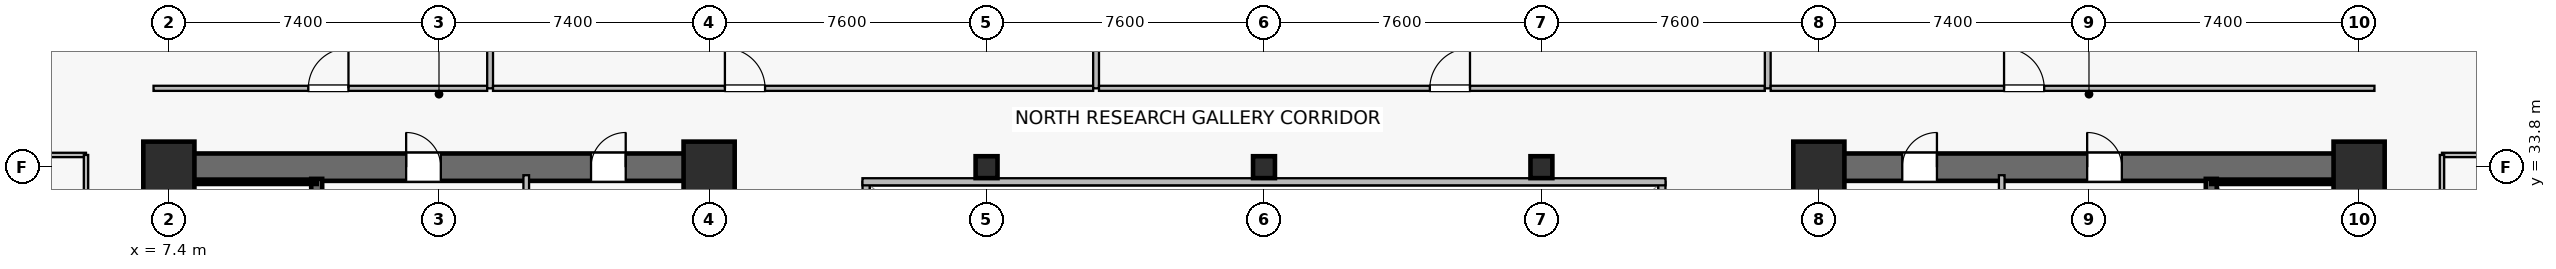
"""IFC4 building model, lengths in metres.
Left out: names, types, materials, properties, quantities, classifications, styles, units other than length and angle.
Written with IfcOpenShell. Run it as: python <this file> out.ifc"""

import sys

from ifc_helpers import new_model, si_unit, direction, frame, frame_2d, origin, origin_2d, place, context, subcontext, project, spatial, rectangle, hollow_rectangle, extrude, source, transform, mapped, element, fill, save


model = new_model("IFC4")
c1 = context("Model", 3, precision=1e-05, world=origin(), true_north=direction((0.0, 1.0)))
c2 = subcontext(c1, "Body", "Model", "MODEL_VIEW")
j1 = project(units=[si_unit("LENGTHUNIT", "METRE"), si_unit("PLANEANGLEUNIT", "RADIAN")], contexts=[c1])
p1 = place(None, origin())
s1 = spatial("IfcSite", under=j1, at=p1, CompositionType="ELEMENT")
p2 = place(p1, origin())
s2 = spatial("IfcBuilding", under=s1, at=p2, CompositionType="ELEMENT")
p3 = place(p2, frame((0.0, 0.0, 90.8)))
s3 = spatial("IfcBuildingStorey", under=s2, at=p3, CompositionType="ELEMENT", Elevation=90.8)
p4 = place(p3, frame((7.025, 33.8, 0.0), z_axis=(0.0, 0.0, 1.0), x_axis=(1.0, 0.0, 0.0)))
e1 = element("IfcWall", 1, at=p4, inside=s3, PredefinedType="SHEAR", context=c2, shape_type="SweptSolid", body=[
    extrude(rectangle(XDim=15.55, YDim=0.75, at=frame_2d((7.775, 0.0))), origin(), (0.0, 0.0, 1.0), 3.78),
])
p5 = place(p4, frame((6.875, 0.0, 0.0)))
e2 = element("IfcOpeningElement", 2, at=p5, cuts=e1, PredefinedType="OPENING", context=c2, shape_type="SweptSolid", body=[
    extrude(rectangle(XDim=0.95, YDim=2.15, at=frame_2d((0.475, 1.075))), frame((0.0, 0.385, 0.0), z_axis=(0.0, -1.0, 0.0), x_axis=(1.0, 0.0, 0.0)), (0.0, 0.0, 1.0), 0.77),
])
p6 = place(p4, frame((11.94, 0.0, 0.0)))
e3 = element("IfcOpeningElement", 3, at=p6, cuts=e1, PredefinedType="OPENING", context=c2, shape_type="SweptSolid", body=[
    extrude(rectangle(XDim=0.95, YDim=2.15, at=frame_2d((0.475, 1.075))), frame((0.0, 0.385, 0.0), z_axis=(0.0, -1.0, 0.0), x_axis=(1.0, 0.0, 0.0)), (0.0, 0.0, 1.0), 0.77),
])
p7 = place(p3, frame((7.4, 15.175, 0.0), z_axis=(0.0, 0.0, 1.0), x_axis=(0.0, 1.0, 0.0)))
e4 = element("IfcWall", 4, at=p7, inside=s3, PredefinedType="SHEAR", context=c2, shape_type="SweptSolid", body=[
    extrude(rectangle(XDim=18.25, YDim=0.75, at=frame_2d((9.125, 0.0))), origin(), (0.0, 0.0, 1.0), 3.78),
])
p8 = place(p3, frame((22.2, 15.175, 0.0), z_axis=(0.0, 0.0, 1.0), x_axis=(0.0, 1.0, 0.0)))
e5 = element("IfcWall", 5, at=p8, inside=s3, PredefinedType="SHEAR", context=c2, shape_type="SweptSolid", body=[
    extrude(rectangle(XDim=18.25, YDim=0.75, at=frame_2d((9.125, 0.0))), origin(), (0.0, 0.0, 1.0), 3.78),
])
p9 = place(p8, frame((3.375, 0.0, 0.0)))
e6 = element("IfcOpeningElement", 6, at=p9, cuts=e5, PredefinedType="OPENING", context=c2, shape_type="SweptSolid", body=[
    extrude(rectangle(XDim=1.42, YDim=2.2, at=frame_2d((0.71, 1.1))), frame((0.0, 0.385, 0.0), z_axis=(0.0, -1.0, 0.0), x_axis=(1.0, 0.0, 0.0)), (0.0, 0.0, 1.0), 0.77),
])
p10 = place(p3, frame((11.45, 24.85, 0.0), z_axis=(0.0, 0.0, 1.0), x_axis=(0.0, 1.0, 0.0)))
e7 = element("IfcWall", 7, at=p10, inside=s3, PredefinedType="SHEAR", context=c2, shape_type="SweptSolid", body=[
    extrude(rectangle(XDim=8.63, YDim=0.3, at=frame_2d((4.315, 0.0))), origin(), (0.0, 0.0, 1.0), 3.78),
])
p11 = place(p10, frame((0.42, 0.0, 0.0)))
e8 = element("IfcOpeningElement", 8, at=p11, cuts=e7, PredefinedType="OPENING", context=c2, shape_type="SweptSolid", body=[
    extrude(rectangle(XDim=1.1, YDim=2.15, at=frame_2d((0.55, 1.075))), frame((0.0, 0.16, 0.0), z_axis=(0.0, -1.0, 0.0), x_axis=(1.0, 0.0, 0.0)), (0.0, 0.0, 1.0), 0.32),
])
p12 = place(p3, frame((7.73, 33.4, 0.0), z_axis=(0.0, 0.0, 1.0), x_axis=(1.0, 0.0, 0.0)))
e9 = element("IfcWall", 9, at=p12, inside=s3, PredefinedType="SOLIDWALL", context=c2, shape_type="SweptSolid", body=[
    extrude(rectangle(XDim=3.72, YDim=0.12, at=frame_2d((1.86, 0.0))), origin(), (0.0, 0.0, 1.0), 3.78),
])
p13 = place(p3, frame((52.225, 33.8, 0.0), z_axis=(0.0, 0.0, 1.0), x_axis=(1.0, 0.0, 0.0)))
e10 = element("IfcWall", 10, at=p13, inside=s3, PredefinedType="SHEAR", context=c2, shape_type="SweptSolid", body=[
    extrude(rectangle(XDim=15.55, YDim=0.75, at=frame_2d((7.775, 0.0))), origin(), (0.0, 0.0, 1.0), 3.78),
])
p14 = place(p13, frame((7.725, 0.0, 0.0)))
e11 = element("IfcOpeningElement", 11, at=p14, cuts=e10, PredefinedType="OPENING", context=c2, shape_type="SweptSolid", body=[
    extrude(rectangle(XDim=0.95, YDim=2.15, at=frame_2d((0.475, 1.075))), frame((0.0, 0.385, 0.0), z_axis=(0.0, -1.0, 0.0), x_axis=(1.0, 0.0, 0.0)), (0.0, 0.0, 1.0), 0.77),
])
p15 = place(p13, frame((2.66, 0.0, 0.0)))
e12 = element("IfcOpeningElement", 12, at=p15, cuts=e10, PredefinedType="OPENING", context=c2, shape_type="SweptSolid", body=[
    extrude(rectangle(XDim=0.95, YDim=2.15, at=frame_2d((0.475, 1.075))), frame((0.0, 0.385, 0.0), z_axis=(0.0, -1.0, 0.0), x_axis=(1.0, 0.0, 0.0)), (0.0, 0.0, 1.0), 0.77),
])
p16 = place(p3, frame((52.6, 15.175, 0.0), z_axis=(0.0, 0.0, 1.0), x_axis=(0.0, 1.0, 0.0)))
e13 = element("IfcWall", 13, at=p16, inside=s3, PredefinedType="SHEAR", context=c2, shape_type="SweptSolid", body=[
    extrude(rectangle(XDim=18.25, YDim=0.75, at=frame_2d((9.125, 0.0))), origin(), (0.0, 0.0, 1.0), 3.78),
])
p17 = place(p16, frame((3.375, 0.0, 0.0)))
e14 = element("IfcOpeningElement", 14, at=p17, cuts=e13, PredefinedType="OPENING", context=c2, shape_type="SweptSolid", body=[
    extrude(rectangle(XDim=1.42, YDim=2.2, at=frame_2d((0.71, 1.1))), frame((0.0, 0.385, 0.0), z_axis=(0.0, -1.0, 0.0), x_axis=(1.0, 0.0, 0.0)), (0.0, 0.0, 1.0), 0.77),
])
p18 = place(p3, frame((67.4, 15.175, 0.0), z_axis=(0.0, 0.0, 1.0), x_axis=(0.0, 1.0, 0.0)))
e15 = element("IfcWall", 15, at=p18, inside=s3, PredefinedType="SHEAR", context=c2, shape_type="SweptSolid", body=[
    extrude(rectangle(XDim=18.25, YDim=0.75, at=frame_2d((9.125, 0.0))), origin(), (0.0, 0.0, 1.0), 3.78),
])
p19 = place(p3, frame((63.35, 24.85, 0.0), z_axis=(0.0, 0.0, 1.0), x_axis=(0.0, 1.0, 0.0)))
e16 = element("IfcWall", 16, at=p19, inside=s3, PredefinedType="SHEAR", context=c2, shape_type="SweptSolid", body=[
    extrude(rectangle(XDim=8.63, YDim=0.3, at=frame_2d((4.315, 0.0))), origin(), (0.0, 0.0, 1.0), 3.78),
])
p20 = place(p19, frame((0.42, 0.0, 0.0)))
e17 = element("IfcOpeningElement", 17, at=p20, cuts=e16, PredefinedType="OPENING", context=c2, shape_type="SweptSolid", body=[
    extrude(rectangle(XDim=1.1, YDim=2.15, at=frame_2d((0.55, 1.075))), frame((0.0, 0.16, 0.0), z_axis=(0.0, -1.0, 0.0), x_axis=(1.0, 0.0, 0.0)), (0.0, 0.0, 1.0), 0.32),
])
p21 = place(p3, frame((63.35, 33.4, 0.0), z_axis=(0.0, 0.0, 1.0), x_axis=(1.0, 0.0, 0.0)))
e18 = element("IfcWall", 18, at=p21, inside=s3, PredefinedType="SOLIDWALL", context=c2, shape_type="SweptSolid", body=[
    extrude(rectangle(XDim=3.72, YDim=0.12, at=frame_2d((1.86, 0.0))), origin(), (0.0, 0.0, 1.0), 3.78),
])
m1 = source(origin(), c2, "Body", "SweptSolid", [
    extrude(rectangle(XDim=1.4, YDim=1.4, at=origin_2d()), origin(), (0.0, 0.0, 1.0), 4.1),
])
for number, where, z_axis, x_axis in (
    (19, (7.4, 33.8, 0.0), (0.0, 0.0, 1.0), (1.0, 0.0, 0.0)),
    (20, (22.2, 33.8, 0.0), (0.0, 0.0, 1.0), (1.0, 0.0, 0.0)),
    (21, (52.6, 33.8, 0.0), (0.0, 0.0, 1.0), (1.0, 0.0, 0.0)),
    (22, (67.4, 33.8, 0.0), (0.0, 0.0, 1.0), (1.0, 0.0, 0.0)),
):
    element("IfcColumn", number, at=place(p3, frame(where, z_axis=z_axis, x_axis=x_axis)), inside=s3, PredefinedType="COLUMN", context=c2, shape_type="MappedRepresentation", body=[
        mapped(m1, transform((0.0, 0.0, 0.0), scale=1.0)),
    ])
m2 = source(origin(), c2, "Body", "SweptSolid", [
    extrude(hollow_rectangle(XDim=0.6, YDim=0.6, WallThickness=0.028, at=origin_2d()), origin(), (0.0, 0.0, 1.0), 4.1),
])
for number, where, z_axis, x_axis in (
    (23, (29.8, 33.8, 0.0), (0.0, 0.0, 1.0), (1.0, 0.0, 0.0)),
    (24, (37.4, 33.8, 0.0), (0.0, 0.0, 1.0), (1.0, 0.0, 0.0)),
    (25, (45.0, 33.8, 0.0), (0.0, 0.0, 1.0), (1.0, 0.0, 0.0)),
):
    element("IfcColumn", number, at=place(p3, frame(where, z_axis=z_axis, x_axis=x_axis)), inside=s3, PredefinedType="COLUMN", context=c2, shape_type="MappedRepresentation", body=[
        mapped(m2, transform((0.0, 0.0, 0.0), scale=1.0)),
    ])
for number, where, z_axis, x_axis in (
    (26, (17.19, 29.65, 0.0), (0.0, 0.0, 1.0), (0.0, 1.0, 0.0)),
    (27, (57.61, 29.65, 0.0), (0.0, 0.0, 1.0), (0.0, 1.0, 0.0)),
):
    element("IfcWall", number, at=place(p3, frame(where, z_axis=z_axis, x_axis=x_axis)), inside=s3, PredefinedType="PLUMBINGWALL", context=c2, shape_type="SweptSolid", body=[
        extrude(rectangle(XDim=3.93, YDim=0.155, at=frame_2d((1.965, 0.0))), origin(), (0.0, 0.0, 1.0), 3.78),
    ])
p22 = place(p3, frame((26.5, 15.2, 0.0), z_axis=(0.0, 0.0, 1.0), x_axis=(0.0, 1.0, 0.0)))
e28 = element("IfcWall", 28, at=p22, inside=s3, PredefinedType="SOLIDWALL", context=c2, shape_type="SweptSolid", body=[
    extrude(rectangle(XDim=18.2, YDim=0.195, at=frame_2d((9.1, 0.0))), origin(), (0.0, 0.0, 1.0), 3.78),
])
p23 = place(p22, frame((1.8, 0.0, 0.9)))
e29 = element("IfcOpeningElement", 29, at=p23, cuts=e28, PredefinedType="OPENING", context=c2, shape_type="SweptSolid", body=[
    extrude(rectangle(XDim=1.5, YDim=1.4, at=frame_2d((0.75, 0.7))), frame((0.0, 0.107, 0.0), z_axis=(0.0, -1.0, 0.0), x_axis=(1.0, 0.0, 0.0)), (0.0, 0.0, 1.0), 0.215),
])
p24 = place(p22, frame((13.2, 0.0, 0.9)))
e30 = element("IfcOpeningElement", 30, at=p24, cuts=e28, PredefinedType="OPENING", context=c2, shape_type="SweptSolid", body=[
    extrude(rectangle(XDim=1.5, YDim=1.4, at=frame_2d((0.75, 0.7))), frame((0.0, 0.107, 0.0), z_axis=(0.0, -1.0, 0.0), x_axis=(1.0, 0.0, 0.0)), (0.0, 0.0, 1.0), 0.215),
])
p25 = place(p3, frame((48.3, 15.2, 0.0), z_axis=(0.0, 0.0, 1.0), x_axis=(0.0, 1.0, 0.0)))
e31 = element("IfcWall", 31, at=p25, inside=s3, PredefinedType="SOLIDWALL", context=c2, shape_type="SweptSolid", body=[
    extrude(rectangle(XDim=18.2, YDim=0.195, at=frame_2d((9.1, 0.0))), origin(), (0.0, 0.0, 1.0), 3.78),
])
p26 = place(p25, frame((1.8, 0.0, 0.9)))
e32 = element("IfcOpeningElement", 32, at=p26, cuts=e31, PredefinedType="OPENING", context=c2, shape_type="SweptSolid", body=[
    extrude(rectangle(XDim=1.5, YDim=1.4, at=frame_2d((0.75, 0.7))), frame((0.0, 0.107, 0.0), z_axis=(0.0, -1.0, 0.0), x_axis=(1.0, 0.0, 0.0)), (0.0, 0.0, 1.0), 0.215),
])
p27 = place(p25, frame((13.2, 0.0, 0.9)))
e33 = element("IfcOpeningElement", 33, at=p27, cuts=e31, PredefinedType="OPENING", context=c2, shape_type="SweptSolid", body=[
    extrude(rectangle(XDim=1.5, YDim=1.4, at=frame_2d((0.75, 0.7))), frame((0.0, 0.107, 0.0), z_axis=(0.0, -1.0, 0.0), x_axis=(1.0, 0.0, 0.0)), (0.0, 0.0, 1.0), 0.215),
])
p28 = place(p3, frame((26.4, 33.4, 0.0), z_axis=(0.0, 0.0, 1.0), x_axis=(1.0, 0.0, 0.0)))
e34 = element("IfcWall", 34, at=p28, inside=s3, PredefinedType="SOLIDWALL", context=c2, shape_type="SweptSolid", body=[
    extrude(rectangle(XDim=22.0, YDim=0.195, at=frame_2d((11.0, 0.0))), origin(), (0.0, 0.0, 1.0), 3.78),
])
p29 = place(p3, frame((6.98, 35.96, 0.0), z_axis=(0.0, 0.0, 1.0), x_axis=(1.0, 0.0, 0.0)))
e35 = element("IfcWall", 35, at=p29, inside=s3, PredefinedType="PARTITIONING", context=c2, shape_type="SweptSolid", body=[
    extrude(rectangle(XDim=9.14, YDim=0.14, at=frame_2d((4.57, 0.0))), origin(), (0.0, 0.0, 1.0), 3.115),
])
p30 = place(p29, frame((4.24, 0.0, 0.0)))
e36 = element("IfcOpeningElement", 36, at=p30, cuts=e35, PredefinedType="OPENING", context=c2, shape_type="SweptSolid", body=[
    extrude(rectangle(XDim=1.1, YDim=2.18, at=frame_2d((0.55, 1.09))), frame((0.0, 0.08, 0.0), z_axis=(0.0, -1.0, 0.0), x_axis=(1.0, 0.0, 0.0)), (0.0, 0.0, 1.0), 0.16),
])
p31 = place(p3, frame((16.2, 35.96, 0.0), z_axis=(0.0, 0.0, 1.0), x_axis=(0.0, 1.0, 0.0)))
e37 = element("IfcWall", 37, at=p31, inside=s3, PredefinedType="PARTITIONING", context=c2, shape_type="SweptSolid", body=[
    extrude(rectangle(XDim=12.53, YDim=0.16, at=frame_2d((6.265, 0.0))), origin(), (0.0, 0.0, 1.0), 3.015),
])
p32 = place(p3, frame((16.28, 35.96, 0.0), z_axis=(0.0, 0.0, 1.0), x_axis=(1.0, 0.0, 0.0)))
e38 = element("IfcWall", 38, at=p32, inside=s3, PredefinedType="PARTITIONING", context=c2, shape_type="SweptSolid", body=[
    extrude(rectangle(XDim=16.44, YDim=0.14, at=frame_2d((8.22, 0.0))), origin(), (0.0, 0.0, 1.0), 3.115),
])
p33 = place(p32, frame((6.352, 0.0, 0.0)))
e39 = element("IfcOpeningElement", 39, at=p33, cuts=e38, PredefinedType="OPENING", context=c2, shape_type="SweptSolid", body=[
    extrude(rectangle(XDim=1.1, YDim=2.18, at=frame_2d((0.55, 1.09))), frame((0.0, 0.08, 0.0), z_axis=(0.0, -1.0, 0.0), x_axis=(1.0, 0.0, 0.0)), (0.0, 0.0, 1.0), 0.16),
])
p34 = place(p3, frame((32.8, 35.96, 0.0), z_axis=(0.0, 0.0, 1.0), x_axis=(0.0, 1.0, 0.0)))
e40 = element("IfcWall", 40, at=p34, inside=s3, PredefinedType="PARTITIONING", context=c2, shape_type="SweptSolid", body=[
    extrude(rectangle(XDim=11.33, YDim=0.16, at=frame_2d((5.665, 0.0))), origin(), (0.0, 0.0, 1.0), 3.015),
])
p35 = place(p3, frame((32.88, 35.96, 0.0), z_axis=(0.0, 0.0, 1.0), x_axis=(1.0, 0.0, 0.0)))
e41 = element("IfcWall", 41, at=p35, inside=s3, PredefinedType="PARTITIONING", context=c2, shape_type="SweptSolid", body=[
    extrude(rectangle(XDim=18.24, YDim=0.14, at=frame_2d((9.12, 0.0))), origin(), (0.0, 0.0, 1.0), 3.115),
])
p36 = place(p35, frame((9.063, 0.0, 0.0)))
e42 = element("IfcOpeningElement", 42, at=p36, cuts=e41, PredefinedType="OPENING", context=c2, shape_type="SweptSolid", body=[
    extrude(rectangle(XDim=1.1, YDim=2.18, at=frame_2d((0.55, 1.09))), frame((0.0, 0.08, 0.0), z_axis=(0.0, -1.0, 0.0), x_axis=(1.0, 0.0, 0.0)), (0.0, 0.0, 1.0), 0.16),
])
p37 = place(p3, frame((51.2, 35.96, 0.0), z_axis=(0.0, 0.0, 1.0), x_axis=(0.0, 1.0, 0.0)))
e43 = element("IfcWall", 43, at=p37, inside=s3, PredefinedType="PARTITIONING", context=c2, shape_type="SweptSolid", body=[
    extrude(rectangle(XDim=12.53, YDim=0.16, at=frame_2d((6.265, 0.0))), origin(), (0.0, 0.0, 1.0), 3.015),
])
p38 = place(p3, frame((51.28, 35.96, 0.0), z_axis=(0.0, 0.0, 1.0), x_axis=(1.0, 0.0, 0.0)))
e44 = element("IfcWall", 44, at=p38, inside=s3, PredefinedType="PARTITIONING", context=c2, shape_type="SweptSolid", body=[
    extrude(rectangle(XDim=16.54, YDim=0.14, at=frame_2d((8.27, 0.0))), origin(), (0.0, 0.0, 1.0), 3.115),
])
p39 = place(p38, frame((6.393, 0.0, 0.0)))
e45 = element("IfcOpeningElement", 45, at=p39, cuts=e44, PredefinedType="OPENING", context=c2, shape_type="SweptSolid", body=[
    extrude(rectangle(XDim=1.1, YDim=2.18, at=frame_2d((0.55, 1.09))), frame((0.0, 0.08, 0.0), z_axis=(0.0, -1.0, 0.0), x_axis=(1.0, 0.0, 0.0)), (0.0, 0.0, 1.0), 0.16),
])
p40 = place(p3, frame((0.11, 34.135, 0.0), z_axis=(0.0, 0.0, 1.0), x_axis=(1.0, 0.0, 0.0)))
e46 = element("IfcWall", 46, at=p40, inside=s3, PredefinedType="PARTITIONING", context=c2, shape_type="SweptSolid", body=[
    extrude(rectangle(XDim=5.02, YDim=0.12, at=frame_2d((2.51, 0.0))), origin(), (0.0, 0.0, 1.0), 3.78),
])
p41 = place(p3, frame((5.13, 29.26, 0.0), z_axis=(0.0, 0.0, 1.0), x_axis=(0.0, 1.0, 0.0)))
e47 = element("IfcWall", 47, at=p41, inside=s3, PredefinedType="PARTITIONING", context=c2, shape_type="SweptSolid", body=[
    extrude(rectangle(XDim=4.875, YDim=0.12, at=frame_2d((2.438, 0.0))), origin(), (0.0, 0.0, 1.0), 3.78),
])
p42 = place(p41, frame((1.988, 0.0, 0.0)))
e48 = element("IfcOpeningElement", 48, at=p42, cuts=e47, PredefinedType="OPENING", context=c2, shape_type="SweptSolid", body=[
    extrude(rectangle(XDim=0.9, YDim=2.1, at=frame_2d((0.45, 1.05))), frame((0.0, 0.07, 0.0), z_axis=(0.0, -1.0, 0.0), x_axis=(1.0, 0.0, 0.0)), (0.0, 0.0, 1.0), 0.14),
])
p43 = place(p3, frame((69.67, 34.135, 0.0), z_axis=(0.0, 0.0, 1.0), x_axis=(1.0, 0.0, 0.0)))
e49 = element("IfcWall", 49, at=p43, inside=s3, PredefinedType="PARTITIONING", context=c2, shape_type="SweptSolid", body=[
    extrude(rectangle(XDim=5.02, YDim=0.12, at=frame_2d((2.51, 0.0))), origin(), (0.0, 0.0, 1.0), 3.78),
])
p44 = place(p3, frame((69.67, 22.66, 0.0), z_axis=(0.0, 0.0, 1.0), x_axis=(0.0, 1.0, 0.0)))
e50 = element("IfcWall", 50, at=p44, inside=s3, PredefinedType="PARTITIONING", context=c2, shape_type="SweptSolid", body=[
    extrude(rectangle(XDim=11.475, YDim=0.12, at=frame_2d((5.738, 0.0))), origin(), (0.0, 0.0, 1.0), 3.78),
])
p45 = place(p44, frame((5.288, 0.0, 0.0)))
e51 = element("IfcOpeningElement", 51, at=p45, cuts=e50, PredefinedType="OPENING", context=c2, shape_type="SweptSolid", body=[
    extrude(rectangle(XDim=0.9, YDim=2.1, at=frame_2d((0.45, 1.05))), frame((0.0, 0.07, 0.0), z_axis=(0.0, -1.0, 0.0), x_axis=(1.0, 0.0, 0.0)), (0.0, 0.0, 1.0), 0.14),
])
m3 = source(origin(), c2, "Body", "SweptSolid", [
    extrude(rectangle(XDim=0.95, YDim=2.15, at=frame_2d((0.475, 1.075))), frame((0.0, 0.025, 0.0), z_axis=(0.0, -1.0, 0.0), x_axis=(1.0, 0.0, 0.0)), (0.0, 0.0, 1.0), 0.05),
])
p46 = place(p5, origin())
e52 = element("IfcDoor", 52, at=p46, inside=s3, OperationType="SINGLE_SWING_LEFT", PredefinedType="DOOR", context=c2, shape_type="MappedRepresentation", body=[
    mapped(m3, transform((0.0, 0.0, 0.0), scale=1.0)),
])
fill(e2, e52)
p47 = place(p6, origin())
e53 = element("IfcDoor", 53, at=p47, inside=s3, OperationType="SINGLE_SWING_RIGHT", PredefinedType="DOOR", context=c2, shape_type="MappedRepresentation", body=[
    mapped(m3, transform((0.0, 0.0, 0.0), scale=1.0)),
])
fill(e3, e53)
p48 = place(p14, origin())
e54 = element("IfcDoor", 54, at=p48, inside=s3, OperationType="SINGLE_SWING_LEFT", PredefinedType="DOOR", context=c2, shape_type="MappedRepresentation", body=[
    mapped(m3, transform((0.0, 0.0, 0.0), scale=1.0)),
])
fill(e11, e54)
p49 = place(p15, origin())
e55 = element("IfcDoor", 55, at=p49, inside=s3, OperationType="SINGLE_SWING_RIGHT", PredefinedType="DOOR", context=c2, shape_type="MappedRepresentation", body=[
    mapped(m3, transform((0.0, 0.0, 0.0), scale=1.0)),
])
fill(e12, e55)
m4 = source(origin(), c2, "Body", "SweptSolid", [
    extrude(rectangle(XDim=1.1, YDim=2.18, at=frame_2d((0.55, 1.09))), frame((0.0, 0.025, 0.0), z_axis=(0.0, -1.0, 0.0), x_axis=(1.0, 0.0, 0.0)), (0.0, 0.0, 1.0), 0.05),
])
p50 = place(p30, origin())
e56 = element("IfcDoor", 56, at=p50, inside=s3, OperationType="SINGLE_SWING_RIGHT", PredefinedType="DOOR", context=c2, shape_type="MappedRepresentation", body=[
    mapped(m4, transform((0.0, 0.0, 0.0), scale=1.0)),
])
fill(e36, e56)
p51 = place(p33, origin())
e57 = element("IfcDoor", 57, at=p51, inside=s3, OperationType="SINGLE_SWING_LEFT", PredefinedType="DOOR", context=c2, shape_type="MappedRepresentation", body=[
    mapped(m4, transform((0.0, 0.0, 0.0), scale=1.0)),
])
fill(e39, e57)
p52 = place(p36, origin())
e58 = element("IfcDoor", 58, at=p52, inside=s3, OperationType="SINGLE_SWING_RIGHT", PredefinedType="DOOR", context=c2, shape_type="MappedRepresentation", body=[
    mapped(m4, transform((0.0, 0.0, 0.0), scale=1.0)),
])
fill(e42, e58)
p53 = place(p39, origin())
e59 = element("IfcDoor", 59, at=p53, inside=s3, OperationType="SINGLE_SWING_LEFT", PredefinedType="DOOR", context=c2, shape_type="MappedRepresentation", body=[
    mapped(m4, transform((0.0, 0.0, 0.0), scale=1.0)),
])
fill(e45, e59)
save(model, sys.argv[1])
